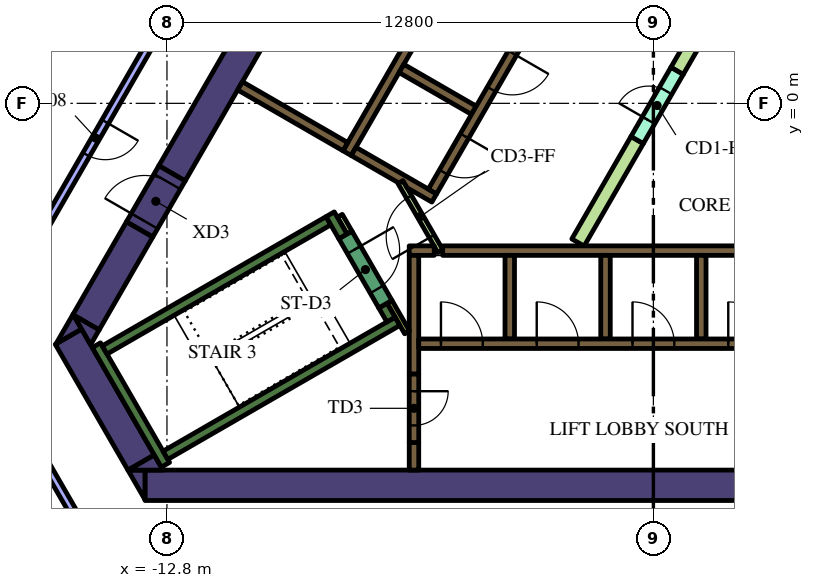
"""IFC4 building model, lengths in metres.
Left out: names, types, materials, properties, quantities, classifications, styles, units other than length and angle.
Written with IfcOpenShell. Run it as: python <this file> out.ifc"""

import sys

from ifc_helpers import new_model, si_unit, direction, frame, frame_2d, origin, place, context, subcontext, project, spatial, polyline, rectangle, outline, extrude, element, fill, save


model = new_model("IFC4")
c1 = context("Model", 3, precision=1e-05, world=origin(), true_north=direction((0.0, 1.0)))
c2 = subcontext(c1, "Body", "Model", "MODEL_VIEW")
j1 = project(units=[si_unit("LENGTHUNIT", "METRE"), si_unit("PLANEANGLEUNIT", "RADIAN")], contexts=[c1])
p1 = place(None, origin())
s1 = spatial("IfcSite", under=j1, at=p1, CompositionType="ELEMENT")
p2 = place(p1, origin())
s2 = spatial("IfcBuilding", under=s1, at=p2, CompositionType="ELEMENT")
p3 = place(p2, frame((0.0, 0.0, 179.4)))
s3 = spatial("IfcBuildingStorey", under=s2, at=p3, CompositionType="ELEMENT", Elevation=179.4)
p4 = place(p3, frame((-13.378, -10.05, 0.0), z_axis=(0.0, 0.0, 1.0), x_axis=(1.0, 0.0, 0.0)))
e1 = element("IfcWall", 1, at=p4, inside=s3, PredefinedType="SOLIDWALL", context=c2, shape_type="SweptSolid", body=[
    extrude(rectangle(XDim=22.282, YDim=0.8, at=frame_2d((11.141, 0.0))), origin(), (0.0, 0.0, 1.0), 4.2),
])
p5 = place(p3, origin())
e2 = element("IfcWall", 2, at=p5, inside=s3, PredefinedType="SOLIDWALL", context=c2, shape_type="SweptSolid", body=[
    extrude(outline(polyline([(-13.828, -9.65), (-13.38, -9.65), (-13.38, -10.426), (-13.828, -9.65)])), origin(), (0.0, 0.0, 1.0), 4.2),
])
p6 = place(p3, frame((-15.392, -6.14, 0.0), z_axis=(0.0, 0.0, 1.0), x_axis=(0.499984020225, -0.866034629516, 0.0)))
e3 = element("IfcWall", 3, at=p6, inside=s3, PredefinedType="SOLIDWALL", context=c2, shape_type="SweptSolid", body=[
    extrude(rectangle(XDim=3.824, YDim=0.8, at=frame_2d((1.912, 0.0))), origin(), (0.0, 0.0, 1.0), 4.2),
])
e4 = element("IfcWall", 4, at=p5, inside=s3, PredefinedType="SOLIDWALL", context=c2, shape_type="SweptSolid", body=[
    extrude(outline(polyline([(-15.047, -5.938), (-15.719, -6.326), (-15.271, -5.55), (-15.047, -5.938)])), origin(), (0.0, 0.0, 1.0), 4.2),
])
e5 = element("IfcWall", 5, at=p5, inside=s3, PredefinedType="SOLIDWALL", context=c2, shape_type="SweptSolid", body=[
    extrude(outline(polyline([(-12.904, -9.65), (-13.82, -9.65), (-13.133, -9.253), (-12.904, -9.65)])), origin(), (0.0, 0.0, 1.0), 4.2),
])
p7 = place(p3, frame((-13.518, -3.314, 0.0), z_axis=(0.0, 0.0, 1.0), x_axis=(-0.499969377405, -0.866043083026, 0.0)))
e6 = element("IfcWall", 6, at=p7, inside=s3, PredefinedType="SOLIDWALL", context=c2, shape_type="SweptSolid", body=[
    extrude(rectangle(XDim=2.824, YDim=0.8, at=frame_2d((1.412, 0.0))), origin(), (0.0, 0.0, 1.0), 4.2),
])
e7 = element("IfcWall", 7, at=p5, inside=s3, PredefinedType="SOLIDWALL", context=c2, shape_type="SweptSolid", body=[
    extrude(outline(polyline([(-14.809, -6.35), (-15.257, -5.574), (-14.585, -5.962), (-14.809, -6.35)])), origin(), (0.0, 0.0, 1.0), 4.2),
])
p8 = place(p3, frame((-12.668, -1.842, 0.0), z_axis=(0.0, 0.0, 1.0), x_axis=(0.500003640647, 0.866023301845, 0.0)))
e8 = element("IfcWall", 8, at=p8, inside=s3, PredefinedType="SOLIDWALL", context=c2, shape_type="SweptSolid", body=[
    extrude(rectangle(XDim=15.858, YDim=0.8, at=frame_2d((7.929, 0.0))), origin(), (0.0, 0.0, 1.0), 4.2),
])
p9 = place(p3, frame((-12.84, -9.511, 0.0), z_axis=(0.0, 0.0, 1.0), x_axis=(-0.499997733992, 0.866026712061, 0.0)))
e9 = element("IfcWall", 9, at=p9, inside=s3, PredefinedType="SOLIDWALL", context=c2, shape_type="SweptSolid", body=[
    extrude(rectangle(XDim=3.634, YDim=0.25, at=frame_2d((1.817, 0.0))), origin(), (0.0, 0.0, 1.0), 4.2),
])
p10 = place(p3, frame((-14.44, -6.49, 0.0), z_axis=(0.0, 0.0, 1.0), x_axis=(0.866022966069, 0.500004222222, 0.0)))
e10 = element("IfcWall", 10, at=p10, inside=s3, PredefinedType="SOLIDWALL", context=c2, shape_type="SweptSolid", body=[
    extrude(rectangle(XDim=6.8, YDim=0.25, at=frame_2d((3.4, 0.0))), origin(), (0.0, 0.0, 1.0), 4.2),
])
p11 = place(p3, frame((-8.168, -3.503, 0.0), z_axis=(0.0, 0.0, 1.0), x_axis=(-0.499952099219, 0.866053057547, 0.0)))
e11 = element("IfcWall", 11, at=p11, inside=s3, PredefinedType="SOLIDWALL", context=c2, shape_type="SweptSolid", body=[
    extrude(rectangle(XDim=0.675, YDim=0.25, at=frame_2d((0.337, 0.0))), origin(), (0.0, 0.0, 1.0), 4.2),
])
p12 = place(p3, frame((-12.84, -9.261, 0.0), z_axis=(0.0, 0.0, 1.0), x_axis=(0.866016039709, 0.500016218704, 0.0)))
e12 = element("IfcWall", 12, at=p12, inside=s3, PredefinedType="SOLIDWALL", context=c2, shape_type="SweptSolid", body=[
    extrude(rectangle(XDim=7.05, YDim=0.25, at=frame_2d((3.525, 0.0))), origin(), (0.0, 0.0, 1.0), 4.2),
])
p13 = place(p3, frame((-6.905, -5.69, 0.0), z_axis=(0.0, 0.0, 1.0), x_axis=(-0.500402024738, 0.865793170242, 0.0)))
e13 = element("IfcWall", 13, at=p13, inside=s3, PredefinedType="SOLIDWALL", context=c2, shape_type="SweptSolid", body=[
    extrude(rectangle(XDim=0.425, YDim=0.25, at=frame_2d((0.212, 0.0))), origin(), (0.0, 0.0, 1.0), 4.2),
])
p14 = place(p3, frame((-6.3, -8.925, 0.0), z_axis=(0.0, 0.0, 1.0), x_axis=(0.0, -1.0, 0.0)))
e14 = element("IfcWall", 14, at=p14, inside=s3, PredefinedType="SOLIDWALL", context=c2, shape_type="SweptSolid", body=[
    extrude(rectangle(XDim=0.725, YDim=0.25, at=frame_2d((0.363, 0.0))), origin(), (0.0, 0.0, 1.0), 4.2),
])
p15 = place(p3, frame((-5.545, -3.875, 0.0), z_axis=(0.0, 0.0, 1.0), x_axis=(1.0, 0.0, 0.0)))
e15 = element("IfcWall", 15, at=p15, inside=s3, PredefinedType="SOLIDWALL", context=c2, shape_type="SweptSolid", body=[
    extrude(rectangle(XDim=11.97, YDim=0.25, at=frame_2d((5.985, 0.0))), origin(), (0.0, 0.0, 1.0), 4.2),
])
p16 = place(p3, frame((-6.425, -3.875, 0.0), z_axis=(0.0, 0.0, 1.0), x_axis=(1.0, 0.0, 0.0)))
e16 = element("IfcWall", 16, at=p16, inside=s3, PredefinedType="SOLIDWALL", context=c2, shape_type="SweptSolid", body=[
    extrude(rectangle(XDim=0.658, YDim=0.25, at=frame_2d((0.329, 0.0))), origin(), (0.0, 0.0, 1.0), 4.2),
])
for number, where, z_axis, x_axis in (
    (17, (1.26, -4.0, 0.0), (0.0, 0.0, 1.0), (0.0, -1.0, 0.0)),
    (18, (-1.26, -4.0, 0.0), (0.0, 0.0, 1.0), (0.0, -1.0, 0.0)),
    (19, (-3.78, -4.0, 0.0), (0.0, 0.0, 1.0), (0.0, -1.0, 0.0)),
):
    element("IfcWall", number, at=place(p3, frame(where, z_axis=z_axis, x_axis=x_axis)), inside=s3, PredefinedType="SOLIDWALL", context=c2, shape_type="SweptSolid", body=[
        extrude(rectangle(XDim=2.2, YDim=0.25, at=frame_2d((1.1, 0.0))), origin(), (0.0, 0.0, 1.0), 4.2),
    ])
p17 = place(p3, frame((-6.3, -7.125, 0.0), z_axis=(0.0, 0.0, 1.0), x_axis=(0.0, 1.0, 0.0)))
e20 = element("IfcWall", 20, at=p17, inside=s3, PredefinedType="SOLIDWALL", context=c2, shape_type="SweptSolid", body=[
    extrude(rectangle(XDim=3.125, YDim=0.25, at=frame_2d((1.562, 0.0))), origin(), (0.0, 0.0, 1.0), 4.2),
])
p18 = place(p3, frame((6.568, -3.627, 0.0), z_axis=(0.0, 0.0, 1.0), x_axis=(-0.499999455981, 0.866025717874, 0.0)))
e21 = element("IfcWall", 21, at=p18, inside=s3, PredefinedType="SOLIDWALL", context=c2, shape_type="SweptSolid", body=[
    extrude(rectangle(XDim=11.978, YDim=0.25, at=frame_2d((5.989, 0.0))), origin(), (0.0, 0.0, 1.0), 4.2),
])
p19 = place(p3, frame((-8.06, -1.311, 0.0), z_axis=(0.0, 0.0, 1.0), x_axis=(0.50000273126, 0.866023826885, 0.0)))
e22 = element("IfcWall", 22, at=p19, inside=s3, PredefinedType="SOLIDWALL", context=c2, shape_type="SweptSolid", body=[
    extrude(rectangle(XDim=10.33, YDim=0.25, at=frame_2d((5.165, 0.0))), origin(), (0.0, 0.0, 1.0), 4.2),
])
p20 = place(p3, frame((-4.724, -0.182, 0.0), z_axis=(0.0, 0.0, 1.0), x_axis=(-0.866008176907, 0.50002983664, 0.0)))
e23 = element("IfcWall", 23, at=p20, inside=s3, PredefinedType="SOLIDWALL", context=c2, shape_type="SweptSolid", body=[
    extrude(rectangle(XDim=2.2, YDim=0.25, at=frame_2d((1.1, 0.0))), origin(), (0.0, 0.0, 1.0), 4.2),
])
e24 = element("IfcWall", 24, at=p5, inside=s3, PredefinedType="SOLIDWALL", context=c2, shape_type="SweptSolid", body=[
    extrude(outline(polyline([(-5.922, -2.257), (-5.922, -2.257), (-5.705, -2.382), (-5.83, -2.598), (-6.483, -2.221), (-6.591, -2.033), (-6.591, -2.033), (-6.7, -2.096), (-7.952, -1.373), (-7.827, -1.156), (-5.922, -2.257)])), origin(), (0.0, 0.0, 1.0), 4.2),
])
p21 = place(p3, frame((-8.106, -1.14, 0.0), z_axis=(0.0, 0.0, 1.0), x_axis=(-0.866008981251, 0.500028443584, 0.0)))
e25 = element("IfcWall", 25, at=p21, inside=s3, PredefinedType="SOLIDWALL", context=c2, shape_type="SweptSolid", body=[
    extrude(rectangle(XDim=3.2, YDim=0.25, at=frame_2d((1.6, 0.0))), origin(), (0.0, 0.0, 1.0), 4.2),
])
p22 = place(p3, frame((-8.252, -2.958, 0.0), z_axis=(0.0, 0.0, 1.0), x_axis=(0.500174715838, -0.865924508047, 0.0)))
e26 = element("IfcWall", 26, at=p22, inside=s3, PredefinedType="PARTITIONING", context=c2, shape_type="SweptSolid", body=[
    extrude(rectangle(XDim=0.514, YDim=0.15, at=frame_2d((0.257, 0.0))), origin(), (0.0, 0.0, 1.0), 3.15),
])
p23 = place(p3, frame((-6.48, -6.027, 0.0), z_axis=(0.0, 0.0, 1.0), x_axis=(-0.499927229454, 0.866067413802, 0.0)))
e27 = element("IfcWall", 27, at=p23, inside=s3, PredefinedType="PARTITIONING", context=c2, shape_type="SweptSolid", body=[
    extrude(rectangle(XDim=0.929, YDim=0.15, at=frame_2d((0.464, 0.0))), origin(), (0.0, 0.0, 1.0), 4.2),
])
e28 = element("IfcWall", 28, at=p5, inside=s3, PredefinedType="PARTITIONING", context=c2, shape_type="SweptSolid", body=[
    extrude(outline(polyline([(2.017, 3.643), (2.342, 3.456), (0.785, 0.76), (0.46, 0.947), (2.017, 3.643)])), origin(), (0.0, 0.0, 1.0), 3.15),
])
e29 = element("IfcWall", 29, at=p5, inside=s3, PredefinedType="PARTITIONING", context=c2, shape_type="SweptSolid", body=[
    extrude(outline(polyline([(-0.59, -0.872), (-0.265, -1.059), (-1.822, -3.756), (-2.147, -3.568), (-0.59, -0.872)])), origin(), (0.0, 0.0, 1.0), 3.15),
])
p24 = place(p3, frame((-6.175, -6.325, 0.0), z_axis=(0.0, 0.0, 1.0), x_axis=(1.0, 0.0, 0.0)))
e30 = element("IfcWall", 30, at=p24, inside=s3, PredefinedType="SOLIDWALL", context=c2, shape_type="SweptSolid", body=[
    extrude(rectangle(XDim=12.35, YDim=0.25, at=frame_2d((6.175, 0.0))), origin(), (0.0, 0.0, 1.0), 4.2),
])
p25 = place(p24, frame((0.585, 0.0, 0.0)))
e31 = element("IfcOpeningElement", 31, at=p25, cuts=e30, PredefinedType="OPENING", context=c2, shape_type="SweptSolid", body=[
    extrude(rectangle(XDim=1.1, YDim=2.1, at=frame_2d((0.55, 1.05))), frame((0.0, 0.135, 0.0), z_axis=(0.0, -1.0, 0.0), x_axis=(1.0, 0.0, 0.0)), (0.0, 0.0, 1.0), 0.27),
])
p26 = place(p24, frame((3.105, 0.0, 0.0)))
e32 = element("IfcOpeningElement", 32, at=p26, cuts=e30, PredefinedType="OPENING", context=c2, shape_type="SweptSolid", body=[
    extrude(rectangle(XDim=1.1, YDim=2.1, at=frame_2d((0.55, 1.05))), frame((0.0, 0.135, 0.0), z_axis=(0.0, -1.0, 0.0), x_axis=(1.0, 0.0, 0.0)), (0.0, 0.0, 1.0), 0.27),
])
p27 = place(p24, frame((5.625, 0.0, 0.0)))
e33 = element("IfcOpeningElement", 33, at=p27, cuts=e30, PredefinedType="OPENING", context=c2, shape_type="SweptSolid", body=[
    extrude(rectangle(XDim=1.1, YDim=2.1, at=frame_2d((0.55, 1.05))), frame((0.0, 0.135, 0.0), z_axis=(0.0, -1.0, 0.0), x_axis=(1.0, 0.0, 0.0)), (0.0, 0.0, 1.0), 0.27),
])
p28 = place(p24, frame((8.145, 0.0, 0.0)))
e34 = element("IfcOpeningElement", 34, at=p28, cuts=e30, PredefinedType="OPENING", context=c2, shape_type="SweptSolid", body=[
    extrude(rectangle(XDim=1.1, YDim=2.1, at=frame_2d((0.55, 1.05))), frame((0.0, 0.135, 0.0), z_axis=(0.0, -1.0, 0.0), x_axis=(1.0, 0.0, 0.0)), (0.0, 0.0, 1.0), 0.27),
])
p29 = place(p24, frame((10.665, 0.0, 0.0)))
e35 = element("IfcOpeningElement", 35, at=p29, cuts=e30, PredefinedType="OPENING", context=c2, shape_type="SweptSolid", body=[
    extrude(rectangle(XDim=1.1, YDim=2.1, at=frame_2d((0.55, 1.05))), frame((0.0, 0.135, 0.0), z_axis=(0.0, -1.0, 0.0), x_axis=(1.0, 0.0, 0.0)), (0.0, 0.0, 1.0), 0.27),
])
p30 = place(p3, frame((-0.898, 6.194, 0.0), z_axis=(0.0, 0.0, 1.0), x_axis=(-0.499996202215, -0.866027596426, 0.0)))
e36 = element("IfcWall", 36, at=p30, inside=s3, PredefinedType="SOLIDWALL", context=c2, shape_type="SweptSolid", body=[
    extrude(rectangle(XDim=9.83, YDim=0.25, at=frame_2d((4.915, 0.0))), origin(), (0.0, 0.0, 1.0), 4.2),
])
p31 = place(p30, frame((0.585, 0.0, 0.0)))
e37 = element("IfcOpeningElement", 37, at=p31, cuts=e36, PredefinedType="OPENING", context=c2, shape_type="SweptSolid", body=[
    extrude(rectangle(XDim=1.1, YDim=2.1, at=frame_2d((0.55, 1.05))), frame((0.0, 0.135, 0.0), z_axis=(0.0, -1.0, 0.0), x_axis=(1.0, 0.0, 0.0)), (0.0, 0.0, 1.0), 0.27),
])
p32 = place(p30, frame((3.105, 0.0, 0.0)))
e38 = element("IfcOpeningElement", 38, at=p32, cuts=e36, PredefinedType="OPENING", context=c2, shape_type="SweptSolid", body=[
    extrude(rectangle(XDim=1.1, YDim=2.1, at=frame_2d((0.55, 1.05))), frame((0.0, 0.135, 0.0), z_axis=(0.0, -1.0, 0.0), x_axis=(1.0, 0.0, 0.0)), (0.0, 0.0, 1.0), 0.27),
])
p33 = place(p30, frame((5.625, 0.0, 0.0)))
e39 = element("IfcOpeningElement", 39, at=p33, cuts=e36, PredefinedType="OPENING", context=c2, shape_type="SweptSolid", body=[
    extrude(rectangle(XDim=1.1, YDim=2.1, at=frame_2d((0.55, 1.05))), frame((0.0, 0.135, 0.0), z_axis=(0.0, -1.0, 0.0), x_axis=(1.0, 0.0, 0.0)), (0.0, 0.0, 1.0), 0.27),
])
p34 = place(p30, frame((8.145, 0.0, 0.0)))
e40 = element("IfcOpeningElement", 40, at=p34, cuts=e36, PredefinedType="OPENING", context=c2, shape_type="SweptSolid", body=[
    extrude(rectangle(XDim=1.1, YDim=2.1, at=frame_2d((0.55, 1.05))), frame((0.0, 0.135, 0.0), z_axis=(0.0, -1.0, 0.0), x_axis=(1.0, 0.0, 0.0)), (0.0, 0.0, 1.0), 0.27),
])
p35 = place(p3, frame((-8.103, -3.466, 0.0), z_axis=(0.0, 0.0, 1.0), x_axis=(0.500078061341, -0.865980330357, 0.0)))
e41 = element("IfcWall", 41, at=p35, inside=s3, PredefinedType="SOLIDWALL", context=c2, shape_type="SweptSolid", body=[
    extrude(rectangle(XDim=2.1, YDim=0.4, at=frame_2d((1.05, 0.0))), origin(), (0.0, 0.0, 1.0), 4.2),
])
p36 = place(p35, frame((0.45, 0.0, 0.0)))
e42 = element("IfcOpeningElement", 42, at=p36, cuts=e41, PredefinedType="OPENING", context=c2, shape_type="SweptSolid", body=[
    extrude(rectangle(XDim=1.2, YDim=2.1, at=frame_2d((0.6, 1.05))), frame((0.0, 0.21, 0.0), z_axis=(0.0, -1.0, 0.0), x_axis=(1.0, 0.0, 0.0)), (0.0, 0.0, 1.0), 0.42),
])
p37 = place(p3, frame((-6.3, -7.125, 0.0), z_axis=(0.0, 0.0, 1.0), x_axis=(0.0, -1.0, 0.0)))
e43 = element("IfcWall", 43, at=p37, inside=s3, PredefinedType="SOLIDWALL", context=c2, shape_type="SweptSolid", body=[
    extrude(rectangle(XDim=1.8, YDim=0.25, at=frame_2d((0.9, 0.0))), origin(), (0.0, 0.0, 1.0), 4.2),
])
p38 = place(p37, frame((0.45, 0.0, 0.0)))
e44 = element("IfcOpeningElement", 44, at=p38, cuts=e43, PredefinedType="OPENING", context=c2, shape_type="SweptSolid", body=[
    extrude(rectangle(XDim=0.9, YDim=2.1, at=frame_2d((0.45, 1.05))), frame((0.0, 0.135, 0.0), z_axis=(0.0, -1.0, 0.0), x_axis=(1.0, 0.0, 0.0)), (0.0, 0.0, 1.0), 0.27),
])
p39 = place(p3, frame((-0.427, -0.966, 0.0), z_axis=(0.0, 0.0, 1.0), x_axis=(0.49994051562, 0.866059744384, 0.0)))
e45 = element("IfcWall", 45, at=p39, inside=s3, PredefinedType="PARTITIONING", context=c2, shape_type="SweptSolid", body=[
    extrude(rectangle(XDim=2.1, YDim=0.375, at=frame_2d((1.05, 0.0))), origin(), (0.0, 0.0, 1.0), 3.15),
])
p40 = place(p39, frame((0.6, 0.0, 0.0)))
e46 = element("IfcOpeningElement", 46, at=p40, cuts=e45, PredefinedType="OPENING", context=c2, shape_type="SweptSolid", body=[
    extrude(rectangle(XDim=0.9, YDim=2.1, at=frame_2d((0.45, 1.05))), frame((0.0, 0.198, 0.0), z_axis=(0.0, -1.0, 0.0), x_axis=(1.0, 0.0, 0.0)), (0.0, 0.0, 1.0), 0.395),
])
p41 = place(p3, frame((-5.606, -3.89, 0.0), z_axis=(0.0, 0.0, 1.0), x_axis=(-0.500027713859, 0.866009402589, 0.0)))
e47 = element("IfcWall", 47, at=p41, inside=s3, PredefinedType="PARTITIONING", context=c2, shape_type="SweptSolid", body=[
    extrude(rectangle(XDim=2.1, YDim=0.15, at=frame_2d((1.05, 0.0))), origin(), (0.0, 0.0, 1.0), 3.15),
])
p42 = place(p41, frame((0.45, 0.0, 0.0)))
e48 = element("IfcOpeningElement", 48, at=p42, cuts=e47, PredefinedType="OPENING", context=c2, shape_type="SweptSolid", body=[
    extrude(rectangle(XDim=1.2, YDim=2.1, at=frame_2d((0.6, 1.05))), frame((0.0, 0.085, 0.0), z_axis=(0.0, -1.0, 0.0), x_axis=(1.0, 0.0, 0.0)), (0.0, 0.0, 1.0), 0.17),
])
p43 = place(p3, frame((-13.518, -3.314, 0.0), z_axis=(0.0, 0.0, 1.0), x_axis=(0.500000056704, 0.866025371046, 0.0)))
e49 = element("IfcWall", 49, at=p43, inside=s3, PredefinedType="SOLIDWALL", context=c2, shape_type="SweptSolid", body=[
    extrude(rectangle(XDim=1.7, YDim=0.8, at=frame_2d((0.85, 0.0))), origin(), (0.0, 0.0, 1.0), 4.2),
])
p44 = place(p43, frame((0.25, 0.0, 0.0)))
e50 = element("IfcOpeningElement", 50, at=p44, cuts=e49, PredefinedType="OPENING", context=c2, shape_type="SweptSolid", body=[
    extrude(rectangle(XDim=1.2, YDim=2.1, at=frame_2d((0.6, 1.05))), frame((0.0, 0.41, 0.0), z_axis=(0.0, -1.0, 0.0), x_axis=(1.0, 0.0, 0.0)), (0.0, 0.0, 1.0), 0.82),
])
p45 = place(p3, frame((-12.374, 3.068, 0.0), z_axis=(0.0, 0.0, 1.0), x_axis=(-0.50000000053, -0.866025403479, 0.0)))
e51 = element("IfcWall", 51, at=p45, inside=s3, PredefinedType="PARTITIONING", context=c2, shape_type="SweptSolid", body=[
    extrude(rectangle(XDim=9.188, YDim=0.2, at=frame_2d((4.594, 0.0))), origin(), (0.0, 0.0, 1.0), 3.15),
])
p46 = place(p45, frame((4.1, 0.0, 0.0)))
e52 = element("IfcOpeningElement", 52, at=p46, cuts=e51, PredefinedType="OPENING", context=c2, shape_type="SweptSolid", body=[
    extrude(rectangle(XDim=1.0, YDim=2.1, at=frame_2d((0.5, 1.05))), frame((0.0, 0.11, 0.0), z_axis=(0.0, -1.0, 0.0), x_axis=(1.0, 0.0, 0.0)), (0.0, 0.0, 1.0), 0.22),
])
p47 = place(p3, frame((-16.058, -9.387, 0.0), z_axis=(0.0, 0.0, 1.0), x_axis=(0.500046299512, -0.865998671098, 0.0)))
e53 = element("IfcWall", 53, at=p47, inside=s3, PredefinedType="PARTITIONING", context=c2, shape_type="SweptSolid", body=[
    extrude(rectangle(XDim=3.306, YDim=0.2, at=frame_2d((1.653, 0.0))), origin(), (0.0, 0.0, 1.0), 3.15),
])
p48 = place(p25, origin())
e54 = element("IfcDoor", 54, at=p48, inside=s3, OperationType="DOUBLE_DOOR_SLIDING", PredefinedType="DOOR", context=c2, shape_type="SweptSolid", body=[
    extrude(rectangle(XDim=1.1, YDim=2.1, at=frame_2d((0.55, 1.05))), frame((0.0, 0.025, 0.0), z_axis=(0.0, -1.0, 0.0), x_axis=(1.0, 0.0, 0.0)), (0.0, 0.0, 1.0), 0.05),
])
fill(e31, e54)
p49 = place(p26, origin())
e55 = element("IfcDoor", 55, at=p49, inside=s3, OperationType="DOUBLE_DOOR_SLIDING", PredefinedType="DOOR", context=c2, shape_type="SweptSolid", body=[
    extrude(rectangle(XDim=1.1, YDim=2.1, at=frame_2d((0.55, 1.05))), frame((0.0, 0.025, 0.0), z_axis=(0.0, -1.0, 0.0), x_axis=(1.0, 0.0, 0.0)), (0.0, 0.0, 1.0), 0.05),
])
fill(e32, e55)
p50 = place(p27, origin())
e56 = element("IfcDoor", 56, at=p50, inside=s3, OperationType="DOUBLE_DOOR_SLIDING", PredefinedType="DOOR", context=c2, shape_type="SweptSolid", body=[
    extrude(rectangle(XDim=1.1, YDim=2.1, at=frame_2d((0.55, 1.05))), frame((0.0, 0.025, 0.0), z_axis=(0.0, -1.0, 0.0), x_axis=(1.0, 0.0, 0.0)), (0.0, 0.0, 1.0), 0.05),
])
fill(e33, e56)
p51 = place(p28, origin())
e57 = element("IfcDoor", 57, at=p51, inside=s3, OperationType="DOUBLE_DOOR_SLIDING", PredefinedType="DOOR", context=c2, shape_type="SweptSolid", body=[
    extrude(rectangle(XDim=1.1, YDim=2.1, at=frame_2d((0.55, 1.05))), frame((0.0, 0.025, 0.0), z_axis=(0.0, -1.0, 0.0), x_axis=(1.0, 0.0, 0.0)), (0.0, 0.0, 1.0), 0.05),
])
fill(e34, e57)
p52 = place(p33, origin())
e58 = element("IfcDoor", 58, at=p52, inside=s3, OperationType="DOUBLE_DOOR_SLIDING", PredefinedType="DOOR", context=c2, shape_type="SweptSolid", body=[
    extrude(rectangle(XDim=1.1, YDim=2.1, at=frame_2d((0.55, 1.05))), frame((0.0, 0.025, 0.0), z_axis=(0.0, -1.0, 0.0), x_axis=(1.0, 0.0, 0.0)), (0.0, 0.0, 1.0), 0.05),
])
fill(e39, e58)
p53 = place(p34, origin())
e59 = element("IfcDoor", 59, at=p53, inside=s3, OperationType="DOUBLE_DOOR_SLIDING", PredefinedType="DOOR", context=c2, shape_type="SweptSolid", body=[
    extrude(rectangle(XDim=1.1, YDim=2.1, at=frame_2d((0.55, 1.05))), frame((0.0, 0.025, 0.0), z_axis=(0.0, -1.0, 0.0), x_axis=(1.0, 0.0, 0.0)), (0.0, 0.0, 1.0), 0.05),
])
fill(e40, e59)
p54 = place(p36, origin())
e60 = element("IfcDoor", 60, at=p54, inside=s3, OperationType="SINGLE_SWING_LEFT", PredefinedType="DOOR", context=c2, shape_type="SweptSolid", body=[
    extrude(rectangle(XDim=1.2, YDim=2.1, at=frame_2d((0.6, 1.05))), frame((0.0, 0.025, 0.0), z_axis=(0.0, -1.0, 0.0), x_axis=(1.0, 0.0, 0.0)), (0.0, 0.0, 1.0), 0.05),
])
fill(e42, e60)
p55 = place(p38, origin())
e61 = element("IfcDoor", 61, at=p55, inside=s3, OperationType="SINGLE_SWING_LEFT", PredefinedType="DOOR", context=c2, shape_type="SweptSolid", body=[
    extrude(rectangle(XDim=0.9, YDim=2.1, at=frame_2d((0.45, 1.05))), frame((0.0, 0.025, 0.0), z_axis=(0.0, -1.0, 0.0), x_axis=(1.0, 0.0, 0.0)), (0.0, 0.0, 1.0), 0.05),
])
fill(e44, e61)
p56 = place(p40, origin())
e62 = element("IfcDoor", 62, at=p56, inside=s3, OperationType="SINGLE_SWING_LEFT", PredefinedType="DOOR", context=c2, shape_type="SweptSolid", body=[
    extrude(rectangle(XDim=0.9, YDim=2.1, at=frame_2d((0.45, 1.05))), frame((0.0, 0.025, 0.0), z_axis=(0.0, -1.0, 0.0), x_axis=(1.0, 0.0, 0.0)), (0.0, 0.0, 1.0), 0.05),
])
fill(e46, e62)
p57 = place(p42, origin())
e63 = element("IfcDoor", 63, at=p57, inside=s3, OperationType="SINGLE_SWING_LEFT", PredefinedType="DOOR", context=c2, shape_type="SweptSolid", body=[
    extrude(rectangle(XDim=1.2, YDim=2.1, at=frame_2d((0.6, 1.05))), frame((0.0, 0.025, 0.0), z_axis=(0.0, -1.0, 0.0), x_axis=(1.0, 0.0, 0.0)), (0.0, 0.0, 1.0), 0.05),
])
fill(e48, e63)
p58 = place(p44, origin())
e64 = element("IfcDoor", 64, at=p58, inside=s3, OperationType="SINGLE_SWING_LEFT", PredefinedType="DOOR", context=c2, shape_type="SweptSolid", body=[
    extrude(rectangle(XDim=1.2, YDim=2.1, at=frame_2d((0.6, 1.05))), frame((0.0, 0.025, 0.0), z_axis=(0.0, -1.0, 0.0), x_axis=(1.0, 0.0, 0.0)), (0.0, 0.0, 1.0), 0.05),
])
fill(e50, e64)
p59 = place(p46, origin())
e65 = element("IfcDoor", 65, at=p59, inside=s3, OperationType="SINGLE_SWING_RIGHT", PredefinedType="DOOR", context=c2, shape_type="SweptSolid", body=[
    extrude(rectangle(XDim=1.0, YDim=2.1, at=frame_2d((0.5, 1.05))), frame((0.0, 0.025, 0.0), z_axis=(0.0, -1.0, 0.0), x_axis=(1.0, 0.0, 0.0)), (0.0, 0.0, 1.0), 0.05),
])
fill(e52, e65)
save(model, sys.argv[1])
